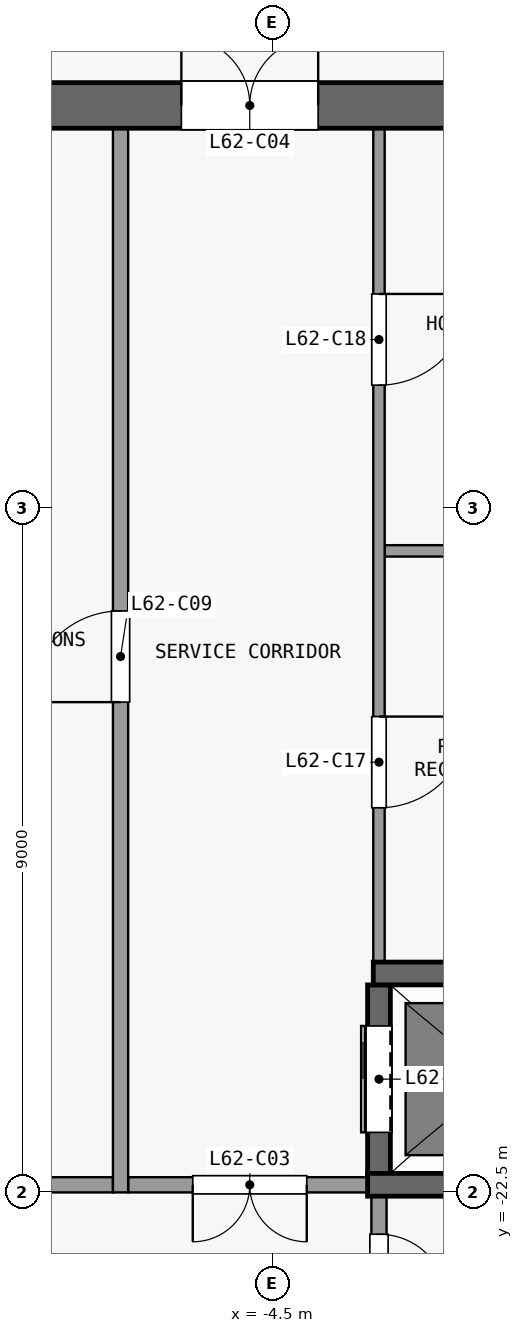
"""IFC4 building model, lengths in metres.
Left out: names, types, materials, properties, quantities, classifications, styles, units other than length and angle.
Written with IfcOpenShell. Run it as: python <this file> out.ifc"""

import sys

from ifc_helpers import new_model, si_unit, direction, frame, frame_2d, origin, place, context, subcontext, project, spatial, rectangle, extrude, element, fill, save


model = new_model("IFC4")
c1 = context("Model", 3, precision=1e-05, world=origin(), true_north=direction((0.0, 1.0)))
c2 = subcontext(c1, "Body", "Model", "MODEL_VIEW")
j1 = project(units=[si_unit("LENGTHUNIT", "METRE"), si_unit("PLANEANGLEUNIT", "RADIAN")], contexts=[c1])
p1 = place(None, origin())
s1 = spatial("IfcSite", under=j1, at=p1, CompositionType="ELEMENT")
p2 = place(p1, origin())
s2 = spatial("IfcBuilding", under=s1, at=p2, CompositionType="ELEMENT")
p3 = place(p2, frame((0.0, 0.0, 244.7)))
s3 = spatial("IfcBuildingStorey", under=s2, at=p3, CompositionType="ELEMENT", Elevation=244.7)
p4 = place(p3, frame((-13.2, -8.2, 0.0), z_axis=(0.0, 0.0, 1.0), x_axis=(1.0, 0.0, 0.0)))
e1 = element("IfcWall", 1, at=p4, inside=s3, PredefinedType="SHEAR", context=c2, shape_type="SweptSolid", body=[
    extrude(rectangle(XDim=26.4, YDim=0.6, at=frame_2d((13.2, 0.0))), origin(), (0.0, 0.0, 1.0), 3.15),
])
p5 = place(p4, frame((7.5, 0.0, 0.0)))
e2 = element("IfcOpeningElement", 2, at=p5, cuts=e1, PredefinedType="OPENING", context=c2, shape_type="SweptSolid", body=[
    extrude(rectangle(XDim=1.8, YDim=2.1, at=frame_2d((0.9, 1.05))), frame((0.0, 0.31, 0.0), z_axis=(0.0, -1.0, 0.0), x_axis=(1.0, 0.0, 0.0)), (0.0, 0.0, 1.0), 0.62),
])
p6 = place(p4, frame((17.1, 0.0, 0.0)))
e3 = element("IfcOpeningElement", 3, at=p6, cuts=e1, PredefinedType="OPENING", context=c2, shape_type="SweptSolid", body=[
    extrude(rectangle(XDim=1.8, YDim=2.1, at=frame_2d((0.9, 1.05))), frame((0.0, 0.31, 0.0), z_axis=(0.0, -1.0, 0.0), x_axis=(1.0, 0.0, 0.0)), (0.0, 0.0, 1.0), 0.62),
])
p7 = place(p4, frame((2.425, 0.0, 0.0)))
e4 = element("IfcOpeningElement", 4, at=p7, cuts=e1, PredefinedType="OPENING", context=c2, shape_type="SweptSolid", body=[
    extrude(rectangle(XDim=0.9, YDim=2.1, at=frame_2d((0.45, 1.05))), frame((0.0, 0.31, 0.0), z_axis=(0.0, -1.0, 0.0), x_axis=(1.0, 0.0, 0.0)), (0.0, 0.0, 1.0), 0.62),
])
p8 = place(p4, frame((23.075, 0.0, 0.0)))
e5 = element("IfcOpeningElement", 5, at=p8, cuts=e1, PredefinedType="OPENING", context=c2, shape_type="SweptSolid", body=[
    extrude(rectangle(XDim=0.9, YDim=2.1, at=frame_2d((0.45, 1.05))), frame((0.0, 0.31, 0.0), z_axis=(0.0, -1.0, 0.0), x_axis=(1.0, 0.0, 0.0)), (0.0, 0.0, 1.0), 0.62),
])
p9 = place(p3, frame((-9.45, -22.4, 0.0), z_axis=(0.0, 0.0, 1.0), x_axis=(1.0, 0.0, 0.0)))
e6 = element("IfcWall", 6, at=p9, inside=s3, PredefinedType="PARTITIONING", context=c2, shape_type="SweptSolid", body=[
    extrude(rectangle(XDim=2.85, YDim=0.2, at=frame_2d((1.425, 0.0))), origin(), (0.0, 0.0, 1.0), 3.15),
])
p10 = place(p3, frame((-3.25, -22.4, 0.0), z_axis=(0.0, 0.0, 1.0), x_axis=(-1.0, 0.0, 0.0)))
e7 = element("IfcWall", 7, at=p10, inside=s3, PredefinedType="PARTITIONING", context=c2, shape_type="SweptSolid", body=[
    extrude(rectangle(XDim=3.15, YDim=0.2, at=frame_2d((1.575, 0.0))), origin(), (0.0, 0.0, 1.0), 3.15),
])
p11 = place(p10, frame((0.8, 0.0, 0.0)))
e8 = element("IfcOpeningElement", 8, at=p11, cuts=e7, PredefinedType="OPENING", context=c2, shape_type="SweptSolid", body=[
    extrude(rectangle(XDim=1.5, YDim=2.1, at=frame_2d((0.75, 1.05))), frame((0.0, 0.11, 0.0), z_axis=(0.0, -1.0, 0.0), x_axis=(1.0, 0.0, 0.0)), (0.0, 0.0, 1.0), 0.22),
])
p12 = place(p3, frame((-3.25, -22.4, 0.0), z_axis=(0.0, 0.0, 1.0), x_axis=(1.0, 0.0, 0.0)))
e9 = element("IfcWall", 9, at=p12, inside=s3, PredefinedType="SHEAR", context=c2, shape_type="SweptSolid", body=[
    extrude(rectangle(XDim=6.5, YDim=0.3, at=frame_2d((3.25, 0.0))), origin(), (0.0, 0.0, 1.0), 3.15),
])
p13 = place(p3, frame((-3.175, -19.62, 0.0), z_axis=(0.0, 0.0, 1.0), x_axis=(1.0, 0.0, 0.0)))
e10 = element("IfcWall", 10, at=p13, inside=s3, PredefinedType="SHEAR", context=c2, shape_type="SweptSolid", body=[
    extrude(rectangle(XDim=3.025, YDim=0.3, at=frame_2d((1.513, 0.0))), origin(), (0.0, 0.0, 1.0), 3.15),
])
p14 = place(p3, frame((-3.025, -14.06, 0.0), z_axis=(0.0, 0.0, 1.0), x_axis=(1.0, 0.0, 0.0)))
e11 = element("IfcWall", 11, at=p14, inside=s3, PredefinedType="PARTITIONING", context=c2, shape_type="SweptSolid", body=[
    extrude(rectangle(XDim=2.925, YDim=0.15, at=frame_2d((1.462, 0.0))), origin(), (0.0, 0.0, 1.0), 3.15),
])
p15 = place(p3, frame((-6.5, -22.5, 0.0), z_axis=(0.0, 0.0, 1.0), x_axis=(0.0, 1.0, 0.0)))
e12 = element("IfcWall", 12, at=p15, inside=s3, PredefinedType="PARTITIONING", context=c2, shape_type="SweptSolid", body=[
    extrude(rectangle(XDim=14.0, YDim=0.2, at=frame_2d((7.0, 0.0))), origin(), (0.0, 0.0, 1.0), 3.15),
])
p16 = place(p15, frame((6.45, 0.0, 0.0)))
e13 = element("IfcOpeningElement", 13, at=p16, cuts=e12, PredefinedType="OPENING", context=c2, shape_type="SweptSolid", body=[
    extrude(rectangle(XDim=1.2, YDim=2.1, at=frame_2d((0.6, 1.05))), frame((0.0, 0.11, 0.0), z_axis=(0.0, -1.0, 0.0), x_axis=(1.0, 0.0, 0.0)), (0.0, 0.0, 1.0), 0.22),
])
p17 = place(p3, frame((-3.1, -22.55, 0.0), z_axis=(0.0, 0.0, 1.0), x_axis=(0.0, -1.0, 0.0)))
e14 = element("IfcWall", 14, at=p17, inside=s3, PredefinedType="PARTITIONING", context=c2, shape_type="SweptSolid", body=[
    extrude(rectangle(XDim=2.05, YDim=0.2, at=frame_2d((1.025, 0.0))), origin(), (0.0, 0.0, 1.0), 3.15),
])
p18 = place(p17, frame((0.5, 0.0, 0.0)))
e15 = element("IfcOpeningElement", 15, at=p18, cuts=e14, PredefinedType="OPENING", context=c2, shape_type="SweptSolid", body=[
    extrude(rectangle(XDim=0.9, YDim=2.1, at=frame_2d((0.45, 1.05))), frame((0.0, 0.11, 0.0), z_axis=(0.0, -1.0, 0.0), x_axis=(1.0, 0.0, 0.0)), (0.0, 0.0, 1.0), 0.22),
])
p19 = place(p3, frame((-3.1, -22.25, 0.0), z_axis=(0.0, 0.0, 1.0), x_axis=(0.0, 1.0, 0.0)))
e16 = element("IfcWall", 16, at=p19, inside=s3, PredefinedType="SHEAR", context=c2, shape_type="SweptSolid", body=[
    extrude(rectangle(XDim=2.48, YDim=0.3, at=frame_2d((1.24, 0.0))), origin(), (0.0, 0.0, 1.0), 3.15),
])
p20 = place(p19, frame((0.54, 0.0, 0.0)))
e17 = element("IfcOpeningElement", 17, at=p20, cuts=e16, PredefinedType="OPENING", context=c2, shape_type="SweptSolid", body=[
    extrude(rectangle(XDim=1.4, YDim=2.1, at=frame_2d((0.7, 1.05))), frame((0.0, 0.16, 0.0), z_axis=(0.0, -1.0, 0.0), x_axis=(1.0, 0.0, 0.0)), (0.0, 0.0, 1.0), 0.32),
])
p21 = place(p3, frame((-3.1, -8.5, 0.0), z_axis=(0.0, 0.0, 1.0), x_axis=(0.0, -1.0, 0.0)))
e18 = element("IfcWall", 18, at=p21, inside=s3, PredefinedType="PARTITIONING", context=c2, shape_type="SweptSolid", body=[
    extrude(rectangle(XDim=10.97, YDim=0.15, at=frame_2d((5.485, 0.0))), origin(), (0.0, 0.0, 1.0), 3.15),
])
p22 = place(p21, frame((7.74, 0.0, 0.0)))
e19 = element("IfcOpeningElement", 19, at=p22, cuts=e18, PredefinedType="OPENING", context=c2, shape_type="SweptSolid", body=[
    extrude(rectangle(XDim=1.2, YDim=2.1, at=frame_2d((0.6, 1.05))), frame((0.0, 0.085, 0.0), z_axis=(0.0, -1.0, 0.0), x_axis=(1.0, 0.0, 0.0)), (0.0, 0.0, 1.0), 0.17),
])
p23 = place(p21, frame((2.18, 0.0, 0.0)))
e20 = element("IfcOpeningElement", 20, at=p23, cuts=e18, PredefinedType="OPENING", context=c2, shape_type="SweptSolid", body=[
    extrude(rectangle(XDim=1.2, YDim=2.1, at=frame_2d((0.6, 1.05))), frame((0.0, 0.085, 0.0), z_axis=(0.0, -1.0, 0.0), x_axis=(1.0, 0.0, 0.0)), (0.0, 0.0, 1.0), 0.17),
])
p24 = place(p20, origin())
e21 = element("IfcDoor", 21, at=p24, inside=s3, OperationType="DOUBLE_DOOR_SLIDING", PredefinedType="DOOR", context=c2, shape_type="SweptSolid", body=[
    extrude(rectangle(XDim=1.4, YDim=2.1, at=frame_2d((0.7, 1.05))), frame((0.0, 0.025, 0.0), z_axis=(0.0, -1.0, 0.0), x_axis=(1.0, 0.0, 0.0)), (0.0, 0.0, 1.0), 0.05),
])
fill(e17, e21)
p25 = place(p11, origin())
e22 = element("IfcDoor", 22, at=p25, inside=s3, OperationType="DOUBLE_DOOR_SINGLE_SWING", PredefinedType="DOOR", context=c2, shape_type="SweptSolid", body=[
    extrude(rectangle(XDim=1.5, YDim=2.1, at=frame_2d((0.75, 1.05))), frame((0.0, 0.025, 0.0), z_axis=(0.0, -1.0, 0.0), x_axis=(1.0, 0.0, 0.0)), (0.0, 0.0, 1.0), 0.05),
])
fill(e8, e22)
p26 = place(p5, origin())
e23 = element("IfcDoor", 23, at=p26, inside=s3, OperationType="DOUBLE_DOOR_SINGLE_SWING", PredefinedType="DOOR", context=c2, shape_type="SweptSolid", body=[
    extrude(rectangle(XDim=1.8, YDim=2.1, at=frame_2d((0.9, 1.05))), frame((0.0, 0.025, 0.0), z_axis=(0.0, -1.0, 0.0), x_axis=(1.0, 0.0, 0.0)), (0.0, 0.0, 1.0), 0.05),
])
fill(e2, e23)
p27 = place(p16, origin())
e24 = element("IfcDoor", 24, at=p27, inside=s3, OperationType="SINGLE_SWING_LEFT", PredefinedType="DOOR", context=c2, shape_type="SweptSolid", body=[
    extrude(rectangle(XDim=1.2, YDim=2.1, at=frame_2d((0.6, 1.05))), frame((0.0, 0.025, 0.0), z_axis=(0.0, -1.0, 0.0), x_axis=(1.0, 0.0, 0.0)), (0.0, 0.0, 1.0), 0.05),
])
fill(e13, e24)
p28 = place(p18, origin())
e25 = element("IfcDoor", 25, at=p28, inside=s3, OperationType="SINGLE_SWING_RIGHT", PredefinedType="DOOR", context=c2, shape_type="SweptSolid", body=[
    extrude(rectangle(XDim=0.9, YDim=2.1, at=frame_2d((0.45, 1.05))), frame((0.0, 0.025, 0.0), z_axis=(0.0, -1.0, 0.0), x_axis=(1.0, 0.0, 0.0)), (0.0, 0.0, 1.0), 0.05),
])
fill(e15, e25)
p29 = place(p22, origin())
e26 = element("IfcDoor", 26, at=p29, inside=s3, OperationType="SINGLE_SWING_LEFT", PredefinedType="DOOR", context=c2, shape_type="SweptSolid", body=[
    extrude(rectangle(XDim=1.2, YDim=2.1, at=frame_2d((0.6, 1.05))), frame((0.0, 0.025, 0.0), z_axis=(0.0, -1.0, 0.0), x_axis=(1.0, 0.0, 0.0)), (0.0, 0.0, 1.0), 0.05),
])
fill(e19, e26)
p30 = place(p23, origin())
e27 = element("IfcDoor", 27, at=p30, inside=s3, OperationType="SINGLE_SWING_LEFT", PredefinedType="DOOR", context=c2, shape_type="SweptSolid", body=[
    extrude(rectangle(XDim=1.2, YDim=2.1, at=frame_2d((0.6, 1.05))), frame((0.0, 0.025, 0.0), z_axis=(0.0, -1.0, 0.0), x_axis=(1.0, 0.0, 0.0)), (0.0, 0.0, 1.0), 0.05),
])
fill(e20, e27)
save(model, sys.argv[1])
